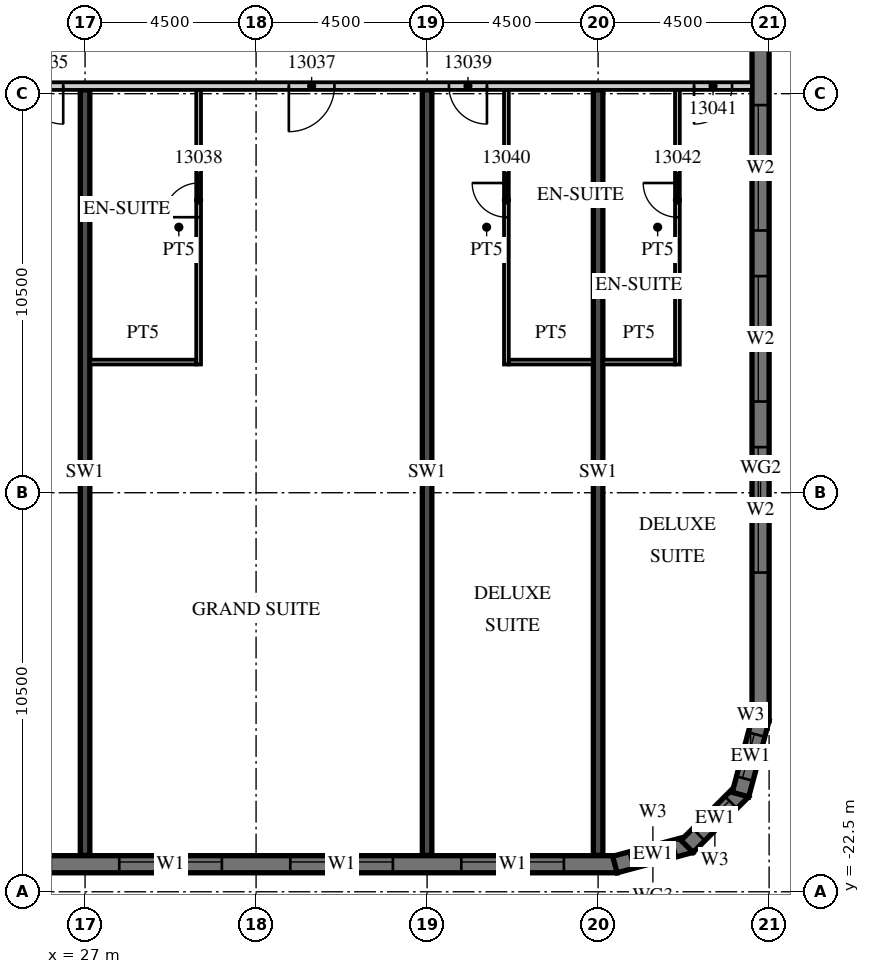
"""IFC4 building model, lengths in metres.
Left out: names, types, materials, properties, quantities, classifications, styles, units other than length and angle.
Written with IfcOpenShell. Run it as: python <this file> out.ifc"""

import sys

from ifc_helpers import new_model, si_unit, direction, frame, frame_2d, origin, place, context, subcontext, project, spatial, polyline, rectangle, outline, extrude, element, fill, save


model = new_model("IFC4")
c1 = context("Model", 3, precision=1e-05, world=origin(), true_north=direction((0.0, 1.0)))
c2 = subcontext(c1, "Body", "Model", "MODEL_VIEW")
j1 = project(units=[si_unit("LENGTHUNIT", "METRE"), si_unit("PLANEANGLEUNIT", "RADIAN")], contexts=[c1])
p1 = place(None, origin())
s1 = spatial("IfcSite", under=j1, at=p1, CompositionType="ELEMENT")
p2 = place(p1, origin())
s2 = spatial("IfcBuilding", under=s1, at=p2, CompositionType="ELEMENT")
p3 = place(p2, frame((0.0, 0.0, 73.2)))
s3 = spatial("IfcBuildingStorey", under=s2, at=p3, CompositionType="ELEMENT", Elevation=73.2)
for number, where, z_axis, x_axis in (
    (1, (27.0, -21.54, 0.0), (0.0, 0.0, 1.0), (0.0, 1.0, 0.0)),
    (2, (36.0, -21.54, 0.0), (0.0, 0.0, 1.0), (0.0, 1.0, 0.0)),
    (3, (40.5, -21.54, 0.0), (0.0, 0.0, 1.0), (0.0, 1.0, 0.0)),
):
    element("IfcWall", number, at=place(p3, frame(where, z_axis=z_axis, x_axis=x_axis)), inside=s3, PredefinedType="SHEAR", context=c2, shape_type="SweptSolid", body=[
        extrude(rectangle(XDim=20.14, YDim=0.25, at=frame_2d((10.07, 0.0))), origin(), (0.0, 0.0, 1.0), 3.3),
    ])
p4 = place(p3, frame((-13.5, -21.775, 0.0), z_axis=(0.0, 0.0, 1.0), x_axis=(1.0, 0.0, 0.0)))
e4 = element("IfcWall", 4, at=p4, inside=s3, PredefinedType="SOLIDWALL", context=c2, shape_type="SweptSolid", body=[
    extrude(rectangle(XDim=54.5, YDim=0.45, at=frame_2d((27.25, 0.0))), origin(), (0.0, 0.0, 1.0), 3.02),
])
p5 = place(p4, frame((0.9, 0.0, 0.45)))
e5 = element("IfcOpeningElement", 5, at=p5, cuts=e4, PredefinedType="OPENING", context=c2, shape_type="SweptSolid", body=[
    extrude(rectangle(XDim=2.7, YDim=2.25, at=frame_2d((1.35, 1.125))), frame((0.0, 0.235, 0.0), z_axis=(0.0, -1.0, 0.0), x_axis=(1.0, 0.0, 0.0)), (0.0, 0.0, 1.0), 0.47),
])
p6 = place(p4, frame((5.4, 0.0, 0.45)))
e6 = element("IfcOpeningElement", 6, at=p6, cuts=e4, PredefinedType="OPENING", context=c2, shape_type="SweptSolid", body=[
    extrude(rectangle(XDim=2.7, YDim=2.25, at=frame_2d((1.35, 1.125))), frame((0.0, 0.235, 0.0), z_axis=(0.0, -1.0, 0.0), x_axis=(1.0, 0.0, 0.0)), (0.0, 0.0, 1.0), 0.47),
])
p7 = place(p4, frame((9.9, 0.0, 0.45)))
e7 = element("IfcOpeningElement", 7, at=p7, cuts=e4, PredefinedType="OPENING", context=c2, shape_type="SweptSolid", body=[
    extrude(rectangle(XDim=2.7, YDim=2.25, at=frame_2d((1.35, 1.125))), frame((0.0, 0.235, 0.0), z_axis=(0.0, -1.0, 0.0), x_axis=(1.0, 0.0, 0.0)), (0.0, 0.0, 1.0), 0.47),
])
p8 = place(p4, frame((14.4, 0.0, 0.45)))
e8 = element("IfcOpeningElement", 8, at=p8, cuts=e4, PredefinedType="OPENING", context=c2, shape_type="SweptSolid", body=[
    extrude(rectangle(XDim=2.7, YDim=2.25, at=frame_2d((1.35, 1.125))), frame((0.0, 0.235, 0.0), z_axis=(0.0, -1.0, 0.0), x_axis=(1.0, 0.0, 0.0)), (0.0, 0.0, 1.0), 0.47),
])
p9 = place(p4, frame((18.9, 0.0, 0.45)))
e9 = element("IfcOpeningElement", 9, at=p9, cuts=e4, PredefinedType="OPENING", context=c2, shape_type="SweptSolid", body=[
    extrude(rectangle(XDim=2.7, YDim=2.25, at=frame_2d((1.35, 1.125))), frame((0.0, 0.235, 0.0), z_axis=(0.0, -1.0, 0.0), x_axis=(1.0, 0.0, 0.0)), (0.0, 0.0, 1.0), 0.47),
])
p10 = place(p4, frame((23.4, 0.0, 0.45)))
e10 = element("IfcOpeningElement", 10, at=p10, cuts=e4, PredefinedType="OPENING", context=c2, shape_type="SweptSolid", body=[
    extrude(rectangle(XDim=2.7, YDim=2.25, at=frame_2d((1.35, 1.125))), frame((0.0, 0.235, 0.0), z_axis=(0.0, -1.0, 0.0), x_axis=(1.0, 0.0, 0.0)), (0.0, 0.0, 1.0), 0.47),
])
p11 = place(p4, frame((27.9, 0.0, 0.45)))
e11 = element("IfcOpeningElement", 11, at=p11, cuts=e4, PredefinedType="OPENING", context=c2, shape_type="SweptSolid", body=[
    extrude(rectangle(XDim=2.7, YDim=2.25, at=frame_2d((1.35, 1.125))), frame((0.0, 0.235, 0.0), z_axis=(0.0, -1.0, 0.0), x_axis=(1.0, 0.0, 0.0)), (0.0, 0.0, 1.0), 0.47),
])
p12 = place(p4, frame((32.4, 0.0, 0.45)))
e12 = element("IfcOpeningElement", 12, at=p12, cuts=e4, PredefinedType="OPENING", context=c2, shape_type="SweptSolid", body=[
    extrude(rectangle(XDim=2.7, YDim=2.25, at=frame_2d((1.35, 1.125))), frame((0.0, 0.235, 0.0), z_axis=(0.0, -1.0, 0.0), x_axis=(1.0, 0.0, 0.0)), (0.0, 0.0, 1.0), 0.47),
])
p13 = place(p4, frame((36.9, 0.0, 0.45)))
e13 = element("IfcOpeningElement", 13, at=p13, cuts=e4, PredefinedType="OPENING", context=c2, shape_type="SweptSolid", body=[
    extrude(rectangle(XDim=2.7, YDim=2.25, at=frame_2d((1.35, 1.125))), frame((0.0, 0.235, 0.0), z_axis=(0.0, -1.0, 0.0), x_axis=(1.0, 0.0, 0.0)), (0.0, 0.0, 1.0), 0.47),
])
p14 = place(p4, frame((41.4, 0.0, 0.45)))
e14 = element("IfcOpeningElement", 14, at=p14, cuts=e4, PredefinedType="OPENING", context=c2, shape_type="SweptSolid", body=[
    extrude(rectangle(XDim=2.7, YDim=2.25, at=frame_2d((1.35, 1.125))), frame((0.0, 0.235, 0.0), z_axis=(0.0, -1.0, 0.0), x_axis=(1.0, 0.0, 0.0)), (0.0, 0.0, 1.0), 0.47),
])
p15 = place(p4, frame((45.9, 0.0, 0.45)))
e15 = element("IfcOpeningElement", 15, at=p15, cuts=e4, PredefinedType="OPENING", context=c2, shape_type="SweptSolid", body=[
    extrude(rectangle(XDim=2.7, YDim=2.25, at=frame_2d((1.35, 1.125))), frame((0.0, 0.235, 0.0), z_axis=(0.0, -1.0, 0.0), x_axis=(1.0, 0.0, 0.0)), (0.0, 0.0, 1.0), 0.47),
])
p16 = place(p4, frame((50.4, 0.0, 0.45)))
e16 = element("IfcOpeningElement", 16, at=p16, cuts=e4, PredefinedType="OPENING", context=c2, shape_type="SweptSolid", body=[
    extrude(rectangle(XDim=2.7, YDim=2.25, at=frame_2d((1.35, 1.125))), frame((0.0, 0.235, 0.0), z_axis=(0.0, -1.0, 0.0), x_axis=(1.0, 0.0, 0.0)), (0.0, 0.0, 1.0), 0.47),
])
p17 = place(p3, frame((40.942, -21.783, 0.0), z_axis=(0.0, 0.0, 1.0), x_axis=(0.965926999034, 0.25881466832, 0.0)))
e17 = element("IfcWall", 17, at=p17, inside=s3, PredefinedType="SOLIDWALL", context=c2, shape_type="SweptSolid", body=[
    extrude(outline(polyline([(0.0, -0.225), (2.071, -0.225), (1.95, 0.225), (0.121, 0.225), (0.0, -0.225)])), origin(), (0.0, 0.0, 1.0), 3.02),
])
p18 = place(p17, frame((0.435, 0.0, 0.45)))
e18 = element("IfcOpeningElement", 18, at=p18, cuts=e17, PredefinedType="OPENING", context=c2, shape_type="SweptSolid", body=[
    extrude(rectangle(XDim=1.2, YDim=2.25, at=frame_2d((0.6, 1.125))), frame((0.0, 0.235, 0.0), z_axis=(0.0, -1.0, 0.0), x_axis=(1.0, 0.0, 0.0)), (0.0, 0.0, 1.0), 0.47),
])
p19 = place(p3, frame((42.841, -21.305, 0.0), z_axis=(0.0, 0.0, 1.0), x_axis=(0.707106781187, 0.707106781187, 0.0)))
e19 = element("IfcWall", 19, at=p19, inside=s3, PredefinedType="SOLIDWALL", context=c2, shape_type="SweptSolid", body=[
    extrude(outline(polyline([(0.0, -0.225), (2.071, -0.225), (1.95, 0.225), (0.121, 0.225), (0.0, -0.225)])), origin(), (0.0, 0.0, 1.0), 3.02),
])
p20 = place(p19, frame((0.435, 0.0, 0.45)))
e20 = element("IfcOpeningElement", 20, at=p20, cuts=e19, PredefinedType="OPENING", context=c2, shape_type="SweptSolid", body=[
    extrude(rectangle(XDim=1.2, YDim=2.25, at=frame_2d((0.6, 1.125))), frame((0.0, 0.235, 0.0), z_axis=(0.0, -1.0, 0.0), x_axis=(1.0, 0.0, 0.0)), (0.0, 0.0, 1.0), 0.47),
])
p21 = place(p3, frame((44.247, -19.942, 0.0), z_axis=(0.0, 0.0, 1.0), x_axis=(0.25881466832, 0.965926999034, 0.0)))
e21 = element("IfcWall", 21, at=p21, inside=s3, PredefinedType="SOLIDWALL", context=c2, shape_type="SweptSolid", body=[
    extrude(outline(polyline([(-0.0, -0.225), (2.07, -0.225), (1.95, 0.225), (0.12, 0.225), (-0.0, -0.225)])), origin(), (0.0, 0.0, 1.0), 3.02),
])
p22 = place(p21, frame((0.435, 0.0, 0.45)))
e22 = element("IfcOpeningElement", 22, at=p22, cuts=e21, PredefinedType="OPENING", context=c2, shape_type="SweptSolid", body=[
    extrude(rectangle(XDim=1.2, YDim=2.25, at=frame_2d((0.6, 1.125))), frame((0.0, 0.235, 0.0), z_axis=(0.0, -1.0, 0.0), x_axis=(1.0, 0.0, 0.0)), (0.0, 0.0, 1.0), 0.47),
])
p23 = place(p3, frame((44.775, -18.0, 0.0), z_axis=(0.0, 0.0, 1.0), x_axis=(0.0, 1.0, 0.0)))
e23 = element("IfcWall", 23, at=p23, inside=s3, PredefinedType="SOLIDWALL", context=c2, shape_type="SweptSolid", body=[
    extrude(rectangle(XDim=36.0, YDim=0.45, at=frame_2d((18.0, 0.0))), origin(), (0.0, 0.0, 1.0), 3.02),
])
p24 = place(p23, frame((3.9, 0.0, 0.45)))
e24 = element("IfcOpeningElement", 24, at=p24, cuts=e23, PredefinedType="OPENING", context=c2, shape_type="SweptSolid", body=[
    extrude(rectangle(XDim=3.3, YDim=2.25, at=frame_2d((1.65, 1.125))), frame((0.0, 0.235, 0.0), z_axis=(0.0, -1.0, 0.0), x_axis=(1.0, 0.0, 0.0)), (0.0, 0.0, 1.0), 0.47),
])
p25 = place(p23, frame((8.4, 0.0, 0.45)))
e25 = element("IfcOpeningElement", 25, at=p25, cuts=e23, PredefinedType="OPENING", context=c2, shape_type="SweptSolid", body=[
    extrude(rectangle(XDim=3.3, YDim=2.25, at=frame_2d((1.65, 1.125))), frame((0.0, 0.235, 0.0), z_axis=(0.0, -1.0, 0.0), x_axis=(1.0, 0.0, 0.0)), (0.0, 0.0, 1.0), 0.47),
])
p26 = place(p23, frame((12.9, 0.0, 0.45)))
e26 = element("IfcOpeningElement", 26, at=p26, cuts=e23, PredefinedType="OPENING", context=c2, shape_type="SweptSolid", body=[
    extrude(rectangle(XDim=3.3, YDim=2.25, at=frame_2d((1.65, 1.125))), frame((0.0, 0.235, 0.0), z_axis=(0.0, -1.0, 0.0), x_axis=(1.0, 0.0, 0.0)), (0.0, 0.0, 1.0), 0.47),
])
p27 = place(p3, frame((-13.5, -1.3, 0.0), z_axis=(0.0, 0.0, 1.0), x_axis=(1.0, 0.0, 0.0)))
e27 = element("IfcWall", 27, at=p27, inside=s3, PredefinedType="PARTITIONING", context=c2, shape_type="SweptSolid", body=[
    extrude(rectangle(XDim=58.05, YDim=0.2, at=frame_2d((29.025, 0.0))), origin(), (0.0, 0.0, 1.0), 3.02),
])
p28 = place(p27, frame((2.925, 0.0, 0.0)))
e28 = element("IfcOpeningElement", 28, at=p28, cuts=e27, PredefinedType="OPENING", context=c2, shape_type="SweptSolid", body=[
    extrude(rectangle(XDim=1.0, YDim=2.1, at=frame_2d((0.5, 1.05))), frame((0.0, 0.11, 0.0), z_axis=(0.0, -1.0, 0.0), x_axis=(1.0, 0.0, 0.0)), (0.0, 0.0, 1.0), 0.22),
])
p29 = place(p27, frame((5.075, 0.0, 0.0)))
e29 = element("IfcOpeningElement", 29, at=p29, cuts=e27, PredefinedType="OPENING", context=c2, shape_type="SweptSolid", body=[
    extrude(rectangle(XDim=1.0, YDim=2.1, at=frame_2d((0.5, 1.05))), frame((0.0, 0.11, 0.0), z_axis=(0.0, -1.0, 0.0), x_axis=(1.0, 0.0, 0.0)), (0.0, 0.0, 1.0), 0.22),
])
p30 = place(p27, frame((9.55, 0.0, 0.0)))
e30 = element("IfcOpeningElement", 30, at=p30, cuts=e27, PredefinedType="OPENING", context=c2, shape_type="SweptSolid", body=[
    extrude(rectangle(XDim=1.0, YDim=2.1, at=frame_2d((0.5, 1.05))), frame((0.0, 0.11, 0.0), z_axis=(0.0, -1.0, 0.0), x_axis=(1.0, 0.0, 0.0)), (0.0, 0.0, 1.0), 0.22),
])
p31 = place(p27, frame((18.862, 0.0, 0.0)))
e31 = element("IfcOpeningElement", 31, at=p31, cuts=e27, PredefinedType="OPENING", context=c2, shape_type="SweptSolid", body=[
    extrude(rectangle(XDim=1.2, YDim=2.1, at=frame_2d((0.6, 1.05))), frame((0.0, 0.11, 0.0), z_axis=(0.0, -1.0, 0.0), x_axis=(1.0, 0.0, 0.0)), (0.0, 0.0, 1.0), 0.22),
])
p32 = place(p27, frame((27.862, 0.0, 0.0)))
e32 = element("IfcOpeningElement", 32, at=p32, cuts=e27, PredefinedType="OPENING", context=c2, shape_type="SweptSolid", body=[
    extrude(rectangle(XDim=1.2, YDim=2.1, at=frame_2d((0.6, 1.05))), frame((0.0, 0.11, 0.0), z_axis=(0.0, -1.0, 0.0), x_axis=(1.0, 0.0, 0.0)), (0.0, 0.0, 1.0), 0.22),
])
p33 = place(p27, frame((34.45, 0.0, 0.0)))
e33 = element("IfcOpeningElement", 33, at=p33, cuts=e27, PredefinedType="OPENING", context=c2, shape_type="SweptSolid", body=[
    extrude(rectangle(XDim=1.0, YDim=2.1, at=frame_2d((0.5, 1.05))), frame((0.0, 0.11, 0.0), z_axis=(0.0, -1.0, 0.0), x_axis=(1.0, 0.0, 0.0)), (0.0, 0.0, 1.0), 0.22),
])
p34 = place(p27, frame((38.925, 0.0, 0.0)))
e34 = element("IfcOpeningElement", 34, at=p34, cuts=e27, PredefinedType="OPENING", context=c2, shape_type="SweptSolid", body=[
    extrude(rectangle(XDim=1.0, YDim=2.1, at=frame_2d((0.5, 1.05))), frame((0.0, 0.11, 0.0), z_axis=(0.0, -1.0, 0.0), x_axis=(1.0, 0.0, 0.0)), (0.0, 0.0, 1.0), 0.22),
])
p35 = place(p27, frame((45.862, 0.0, 0.0)))
e35 = element("IfcOpeningElement", 35, at=p35, cuts=e27, PredefinedType="OPENING", context=c2, shape_type="SweptSolid", body=[
    extrude(rectangle(XDim=1.2, YDim=2.1, at=frame_2d((0.6, 1.05))), frame((0.0, 0.11, 0.0), z_axis=(0.0, -1.0, 0.0), x_axis=(1.0, 0.0, 0.0)), (0.0, 0.0, 1.0), 0.22),
])
p36 = place(p27, frame((50.075, 0.0, 0.0)))
e36 = element("IfcOpeningElement", 36, at=p36, cuts=e27, PredefinedType="OPENING", context=c2, shape_type="SweptSolid", body=[
    extrude(rectangle(XDim=1.0, YDim=2.1, at=frame_2d((0.5, 1.05))), frame((0.0, 0.11, 0.0), z_axis=(0.0, -1.0, 0.0), x_axis=(1.0, 0.0, 0.0)), (0.0, 0.0, 1.0), 0.22),
])
p37 = place(p27, frame((56.525, 0.0, 0.0)))
e37 = element("IfcOpeningElement", 37, at=p37, cuts=e27, PredefinedType="OPENING", context=c2, shape_type="SweptSolid", body=[
    extrude(rectangle(XDim=1.0, YDim=2.1, at=frame_2d((0.5, 1.05))), frame((0.0, 0.11, 0.0), z_axis=(0.0, -1.0, 0.0), x_axis=(1.0, 0.0, 0.0)), (0.0, 0.0, 1.0), 0.22),
])
p38 = place(p3, frame((29.988, -8.625, 0.0), z_axis=(0.0, 0.0, 1.0), x_axis=(0.0, 1.0, 0.0)))
e38 = element("IfcWall", 38, at=p38, inside=s3, PredefinedType="PARTITIONING", context=c2, shape_type="SweptSolid", body=[
    extrude(rectangle(XDim=7.225, YDim=0.125, at=frame_2d((3.613, 0.0))), origin(), (0.0, 0.0, 1.0), 3.02),
])
p39 = place(p38, frame((3.875, 0.0, 0.0)))
e39 = element("IfcOpeningElement", 39, at=p39, cuts=e38, PredefinedType="OPENING", context=c2, shape_type="SweptSolid", body=[
    extrude(rectangle(XDim=0.9, YDim=2.1, at=frame_2d((0.45, 1.05))), frame((0.0, 0.073, 0.0), z_axis=(0.0, -1.0, 0.0), x_axis=(1.0, 0.0, 0.0)), (0.0, 0.0, 1.0), 0.145),
])
p40 = place(p3, frame((27.125, -8.562, 0.0), z_axis=(0.0, 0.0, 1.0), x_axis=(1.0, 0.0, 0.0)))
e40 = element("IfcWall", 40, at=p40, inside=s3, PredefinedType="PARTITIONING", context=c2, shape_type="SweptSolid", body=[
    extrude(rectangle(XDim=2.8, YDim=0.125, at=frame_2d((1.4, 0.0))), origin(), (0.0, 0.0, 1.0), 3.02),
])
p41 = place(p3, frame((38.087, -8.625, 0.0), z_axis=(0.0, 0.0, 1.0), x_axis=(0.0, 1.0, 0.0)))
e41 = element("IfcWall", 41, at=p41, inside=s3, PredefinedType="PARTITIONING", context=c2, shape_type="SweptSolid", body=[
    extrude(rectangle(XDim=7.225, YDim=0.125, at=frame_2d((3.613, 0.0))), origin(), (0.0, 0.0, 1.0), 3.02),
])
p42 = place(p41, frame((3.875, 0.0, 0.0)))
e42 = element("IfcOpeningElement", 42, at=p42, cuts=e41, PredefinedType="OPENING", context=c2, shape_type="SweptSolid", body=[
    extrude(rectangle(XDim=0.9, YDim=2.1, at=frame_2d((0.45, 1.05))), frame((0.0, 0.073, 0.0), z_axis=(0.0, -1.0, 0.0), x_axis=(1.0, 0.0, 0.0)), (0.0, 0.0, 1.0), 0.145),
])
p43 = place(p3, frame((38.15, -8.562, 0.0), z_axis=(0.0, 0.0, 1.0), x_axis=(1.0, 0.0, 0.0)))
e43 = element("IfcWall", 43, at=p43, inside=s3, PredefinedType="PARTITIONING", context=c2, shape_type="SweptSolid", body=[
    extrude(rectangle(XDim=2.225, YDim=0.125, at=frame_2d((1.113, 0.0))), origin(), (0.0, 0.0, 1.0), 3.02),
])
p44 = place(p3, frame((42.587, -8.625, 0.0), z_axis=(0.0, 0.0, 1.0), x_axis=(0.0, 1.0, 0.0)))
e44 = element("IfcWall", 44, at=p44, inside=s3, PredefinedType="PARTITIONING", context=c2, shape_type="SweptSolid", body=[
    extrude(rectangle(XDim=7.225, YDim=0.125, at=frame_2d((3.613, 0.0))), origin(), (0.0, 0.0, 1.0), 3.02),
])
p45 = place(p44, frame((3.875, 0.0, 0.0)))
e45 = element("IfcOpeningElement", 45, at=p45, cuts=e44, PredefinedType="OPENING", context=c2, shape_type="SweptSolid", body=[
    extrude(rectangle(XDim=0.9, YDim=2.1, at=frame_2d((0.45, 1.05))), frame((0.0, 0.073, 0.0), z_axis=(0.0, -1.0, 0.0), x_axis=(1.0, 0.0, 0.0)), (0.0, 0.0, 1.0), 0.145),
])
p46 = place(p3, frame((40.625, -8.562, 0.0), z_axis=(0.0, 0.0, 1.0), x_axis=(1.0, 0.0, 0.0)))
e46 = element("IfcWall", 46, at=p46, inside=s3, PredefinedType="PARTITIONING", context=c2, shape_type="SweptSolid", body=[
    extrude(rectangle(XDim=1.9, YDim=0.125, at=frame_2d((0.95, 0.0))), origin(), (0.0, 0.0, 1.0), 3.02),
])
p47 = place(p14, origin())
e47 = element("IfcWindow", 47, at=p47, inside=s3, PartitioningType="SINGLE_PANEL", PredefinedType="WINDOW", context=c2, shape_type="SweptSolid", body=[
    extrude(rectangle(XDim=2.7, YDim=2.25, at=frame_2d((1.35, 1.125))), frame((0.0, 0.09, 0.0), z_axis=(0.0, -1.0, 0.0), x_axis=(1.0, 0.0, 0.0)), (0.0, 0.0, 1.0), 0.06),
])
fill(e14, e47)
p48 = place(p15, origin())
e48 = element("IfcWindow", 48, at=p48, inside=s3, PartitioningType="SINGLE_PANEL", PredefinedType="WINDOW", context=c2, shape_type="SweptSolid", body=[
    extrude(rectangle(XDim=2.7, YDim=2.25, at=frame_2d((1.35, 1.125))), frame((0.0, 0.09, 0.0), z_axis=(0.0, -1.0, 0.0), x_axis=(1.0, 0.0, 0.0)), (0.0, 0.0, 1.0), 0.06),
])
fill(e15, e48)
p49 = place(p16, origin())
e49 = element("IfcWindow", 49, at=p49, inside=s3, PartitioningType="SINGLE_PANEL", PredefinedType="WINDOW", context=c2, shape_type="SweptSolid", body=[
    extrude(rectangle(XDim=2.7, YDim=2.25, at=frame_2d((1.35, 1.125))), frame((0.0, 0.09, 0.0), z_axis=(0.0, -1.0, 0.0), x_axis=(1.0, 0.0, 0.0)), (0.0, 0.0, 1.0), 0.06),
])
fill(e16, e49)
p50 = place(p18, origin())
e50 = element("IfcWindow", 50, at=p50, inside=s3, PartitioningType="SINGLE_PANEL", PredefinedType="WINDOW", context=c2, shape_type="SweptSolid", body=[
    extrude(rectangle(XDim=1.2, YDim=2.25, at=frame_2d((0.6, 1.125))), frame((0.0, 0.09, 0.0), z_axis=(0.0, -1.0, 0.0), x_axis=(1.0, 0.0, 0.0)), (0.0, 0.0, 1.0), 0.06),
])
fill(e18, e50)
p51 = place(p20, origin())
e51 = element("IfcWindow", 51, at=p51, inside=s3, PartitioningType="SINGLE_PANEL", PredefinedType="WINDOW", context=c2, shape_type="SweptSolid", body=[
    extrude(rectangle(XDim=1.2, YDim=2.25, at=frame_2d((0.6, 1.125))), frame((0.0, 0.09, 0.0), z_axis=(0.0, -1.0, 0.0), x_axis=(1.0, 0.0, 0.0)), (0.0, 0.0, 1.0), 0.06),
])
fill(e20, e51)
p52 = place(p22, origin())
e52 = element("IfcWindow", 52, at=p52, inside=s3, PartitioningType="SINGLE_PANEL", PredefinedType="WINDOW", context=c2, shape_type="SweptSolid", body=[
    extrude(rectangle(XDim=1.2, YDim=2.25, at=frame_2d((0.6, 1.125))), frame((0.0, 0.09, 0.0), z_axis=(0.0, -1.0, 0.0), x_axis=(1.0, 0.0, 0.0)), (0.0, 0.0, 1.0), 0.06),
])
fill(e22, e52)
p53 = place(p24, origin())
e53 = element("IfcWindow", 53, at=p53, inside=s3, PartitioningType="SINGLE_PANEL", PredefinedType="WINDOW", context=c2, shape_type="SweptSolid", body=[
    extrude(rectangle(XDim=3.3, YDim=2.25, at=frame_2d((1.65, 1.125))), frame((0.0, 0.09, 0.0), z_axis=(0.0, -1.0, 0.0), x_axis=(1.0, 0.0, 0.0)), (0.0, 0.0, 1.0), 0.06),
])
fill(e24, e53)
p54 = place(p25, origin())
e54 = element("IfcWindow", 54, at=p54, inside=s3, PartitioningType="SINGLE_PANEL", PredefinedType="WINDOW", context=c2, shape_type="SweptSolid", body=[
    extrude(rectangle(XDim=3.3, YDim=2.25, at=frame_2d((1.65, 1.125))), frame((0.0, 0.09, 0.0), z_axis=(0.0, -1.0, 0.0), x_axis=(1.0, 0.0, 0.0)), (0.0, 0.0, 1.0), 0.06),
])
fill(e25, e54)
p55 = place(p26, origin())
e55 = element("IfcWindow", 55, at=p55, inside=s3, PartitioningType="SINGLE_PANEL", PredefinedType="WINDOW", context=c2, shape_type="SweptSolid", body=[
    extrude(rectangle(XDim=3.3, YDim=2.25, at=frame_2d((1.65, 1.125))), frame((0.0, 0.09, 0.0), z_axis=(0.0, -1.0, 0.0), x_axis=(1.0, 0.0, 0.0)), (0.0, 0.0, 1.0), 0.06),
])
fill(e26, e55)
p56 = place(p34, origin())
e56 = element("IfcDoor", 56, at=p56, inside=s3, OperationType="SINGLE_SWING_RIGHT", PredefinedType="DOOR", context=c2, shape_type="SweptSolid", body=[
    extrude(rectangle(XDim=1.0, YDim=2.1, at=frame_2d((0.5, 1.05))), frame((0.0, 0.025, 0.0), z_axis=(0.0, -1.0, 0.0), x_axis=(1.0, 0.0, 0.0)), (0.0, 0.0, 1.0), 0.05),
])
fill(e34, e56)
p57 = place(p35, origin())
e57 = element("IfcDoor", 57, at=p57, inside=s3, OperationType="SINGLE_SWING_LEFT", PredefinedType="DOOR", context=c2, shape_type="SweptSolid", body=[
    extrude(rectangle(XDim=1.2, YDim=2.1, at=frame_2d((0.6, 1.05))), frame((0.0, 0.025, 0.0), z_axis=(0.0, -1.0, 0.0), x_axis=(1.0, 0.0, 0.0)), (0.0, 0.0, 1.0), 0.05),
])
fill(e35, e57)
p58 = place(p39, origin())
e58 = element("IfcDoor", 58, at=p58, inside=s3, OperationType="SINGLE_SWING_LEFT", PredefinedType="DOOR", context=c2, shape_type="SweptSolid", body=[
    extrude(rectangle(XDim=0.9, YDim=2.1, at=frame_2d((0.45, 1.05))), frame((0.0, 0.025, 0.0), z_axis=(0.0, -1.0, 0.0), x_axis=(1.0, 0.0, 0.0)), (0.0, 0.0, 1.0), 0.05),
])
fill(e39, e58)
p59 = place(p36, origin())
e59 = element("IfcDoor", 59, at=p59, inside=s3, OperationType="SINGLE_SWING_RIGHT", PredefinedType="DOOR", context=c2, shape_type="SweptSolid", body=[
    extrude(rectangle(XDim=1.0, YDim=2.1, at=frame_2d((0.5, 1.05))), frame((0.0, 0.025, 0.0), z_axis=(0.0, -1.0, 0.0), x_axis=(1.0, 0.0, 0.0)), (0.0, 0.0, 1.0), 0.05),
])
fill(e36, e59)
p60 = place(p42, origin())
e60 = element("IfcDoor", 60, at=p60, inside=s3, OperationType="SINGLE_SWING_RIGHT", PredefinedType="DOOR", context=c2, shape_type="SweptSolid", body=[
    extrude(rectangle(XDim=0.9, YDim=2.1, at=frame_2d((0.45, 1.05))), frame((0.0, 0.025, 0.0), z_axis=(0.0, -1.0, 0.0), x_axis=(1.0, 0.0, 0.0)), (0.0, 0.0, 1.0), 0.05),
])
fill(e42, e60)
p61 = place(p37, origin())
e61 = element("IfcDoor", 61, at=p61, inside=s3, OperationType="SINGLE_SWING_LEFT", PredefinedType="DOOR", context=c2, shape_type="SweptSolid", body=[
    extrude(rectangle(XDim=1.0, YDim=2.1, at=frame_2d((0.5, 1.05))), frame((0.0, 0.025, 0.0), z_axis=(0.0, -1.0, 0.0), x_axis=(1.0, 0.0, 0.0)), (0.0, 0.0, 1.0), 0.05),
])
fill(e37, e61)
p62 = place(p45, origin())
e62 = element("IfcDoor", 62, at=p62, inside=s3, OperationType="SINGLE_SWING_RIGHT", PredefinedType="DOOR", context=c2, shape_type="SweptSolid", body=[
    extrude(rectangle(XDim=0.9, YDim=2.1, at=frame_2d((0.45, 1.05))), frame((0.0, 0.025, 0.0), z_axis=(0.0, -1.0, 0.0), x_axis=(1.0, 0.0, 0.0)), (0.0, 0.0, 1.0), 0.05),
])
fill(e45, e62)
save(model, sys.argv[1])
